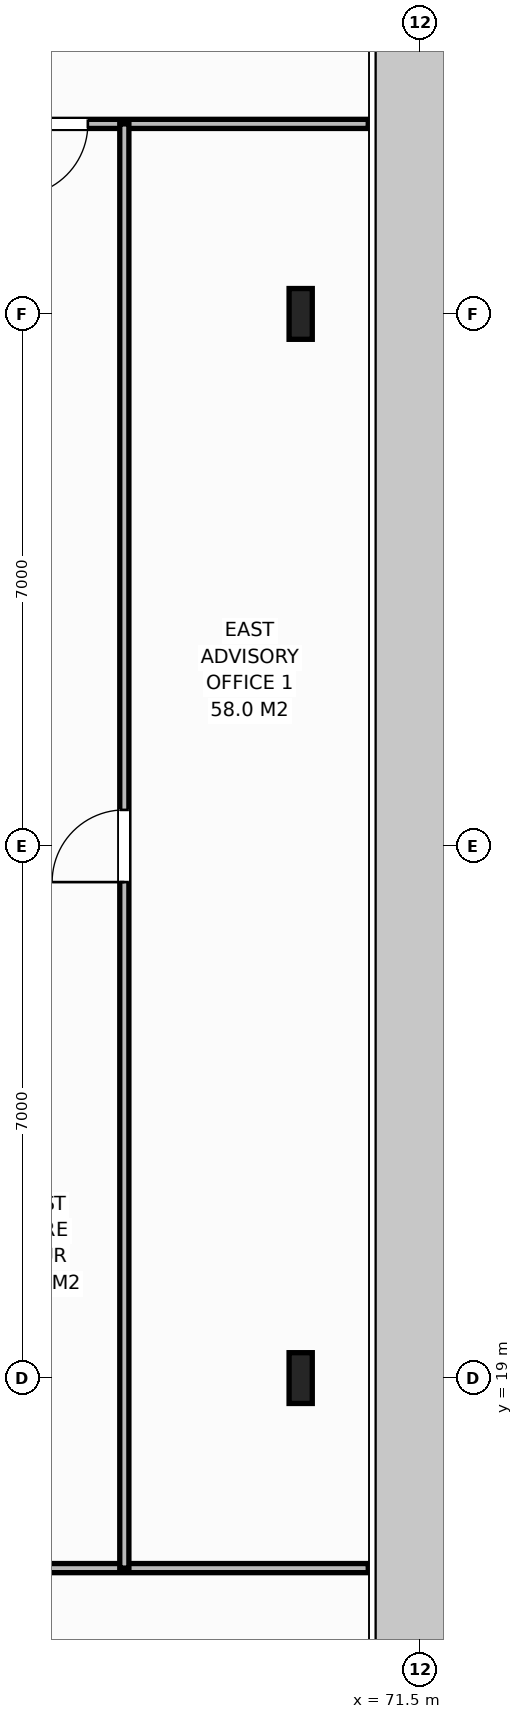
"""IFC4 building model, lengths in metres.
Left out: names, types, materials, properties, quantities, classifications, styles, units other than length and angle.
Written with IfcOpenShell. Run it as: python <this file> out.ifc"""

import sys

from ifc_helpers import new_model, si_unit, direction, frame, frame_2d, origin, origin_2d, place, context, subcontext, project, spatial, rectangle, i_section, extrude, element, fill, save


model = new_model("IFC4")
c1 = context("Model", 3, precision=1e-05, world=origin(), true_north=direction((0.0, 1.0)))
c2 = subcontext(c1, "Body", "Model", "MODEL_VIEW")
j1 = project(units=[si_unit("LENGTHUNIT", "METRE"), si_unit("PLANEANGLEUNIT", "RADIAN")], contexts=[c1])
p1 = place(None, origin())
s1 = spatial("IfcSite", under=j1, at=p1, CompositionType="ELEMENT")
p2 = place(p1, origin())
s2 = spatial("IfcBuilding", under=s1, at=p2, CompositionType="ELEMENT")
p3 = place(p2, frame((0.0, 0.0, 263.2)))
s3 = spatial("IfcBuildingStorey", under=s2, at=p3, CompositionType="ELEMENT", Elevation=263.2)
for number, where, z_axis, x_axis in (
    (1, (69.92, 19.0, 0.0), (0.0, 0.0, 1.0), (1.0, 0.0, 0.0)),
    (2, (69.92, 33.0, 0.0), (0.0, 0.0, 1.0), (1.0, 0.0, 0.0)),
):
    element("IfcColumn", number, at=place(p3, frame(where, z_axis=z_axis, x_axis=x_axis)), inside=s3, PredefinedType="COLUMN", context=c2, shape_type="SweptSolid", body=[
        extrude(i_section(OverallWidth=0.305, OverallDepth=0.668, WebThickness=0.021, FlangeThickness=0.04, at=origin_2d()), origin(), (0.0, 0.0, 1.0), 3.8),
    ])
p4 = place(p3, frame((65.07, 35.5, 0.0), z_axis=(0.0, 0.0, 1.0), x_axis=(1.0, 0.0, 0.0)))
e3 = element("IfcWall", 3, at=p4, inside=s3, PredefinedType="PARTITIONING", context=c2, shape_type="SweptSolid", body=[
    extrude(rectangle(XDim=5.739, YDim=0.12, at=frame_2d((2.87, 0.0))), origin(), (0.0, 0.0, 1.0), 3.588),
])
p5 = place(p4, frame((1.1, 0.0, 0.0)))
e4 = element("IfcOpeningElement", 4, at=p5, cuts=e3, PredefinedType="OPENING", context=c2, shape_type="SweptSolid", body=[
    extrude(rectangle(XDim=0.95, YDim=2.15, at=frame_2d((0.475, 1.075))), frame((0.0, 0.07, 0.0), z_axis=(0.0, -1.0, 0.0), x_axis=(1.0, 0.0, 0.0)), (0.0, 0.0, 1.0), 0.14),
])
p6 = place(p3, frame((56.927, 16.5, 0.0), z_axis=(0.0, 0.0, 1.0), x_axis=(1.0, 0.0, 0.0)))
e5 = element("IfcWall", 5, at=p6, inside=s3, PredefinedType="PARTITIONING", context=c2, shape_type="SweptSolid", body=[
    extrude(rectangle(XDim=13.882, YDim=0.12, at=frame_2d((6.941, 0.0))), origin(), (0.0, 0.0, 1.0), 3.588),
])
p7 = place(p6, frame((4.861, 0.0, 0.0)))
e6 = element("IfcOpeningElement", 6, at=p7, cuts=e5, PredefinedType="OPENING", context=c2, shape_type="SweptSolid", body=[
    extrude(rectangle(XDim=0.95, YDim=2.15, at=frame_2d((0.475, 1.075))), frame((0.0, 0.07, 0.0), z_axis=(0.0, -1.0, 0.0), x_axis=(1.0, 0.0, 0.0)), (0.0, 0.0, 1.0), 0.14),
])
p8 = place(p3, frame((67.6, 16.5, 0.0), z_axis=(0.0, 0.0, 1.0), x_axis=(0.0, 1.0, 0.0)))
e7 = element("IfcWall", 7, at=p8, inside=s3, PredefinedType="PARTITIONING", context=c2, shape_type="SweptSolid", body=[
    extrude(rectangle(XDim=19.0, YDim=0.12, at=frame_2d((9.5, 0.0))), origin(), (0.0, 0.0, 1.0), 3.588),
])
p9 = place(p8, frame((9.025, 0.0, 0.0)))
e8 = element("IfcOpeningElement", 8, at=p9, cuts=e7, PredefinedType="OPENING", context=c2, shape_type="SweptSolid", body=[
    extrude(rectangle(XDim=0.95, YDim=2.15, at=frame_2d((0.475, 1.075))), frame((0.0, 0.07, 0.0), z_axis=(0.0, -1.0, 0.0), x_axis=(1.0, 0.0, 0.0)), (0.0, 0.0, 1.0), 0.14),
])
p10 = place(p5, origin())
e9 = element("IfcDoor", 9, at=p10, inside=s3, OperationType="SINGLE_SWING_RIGHT", PredefinedType="DOOR", context=c2, shape_type="SweptSolid", body=[
    extrude(rectangle(XDim=0.95, YDim=2.15, at=frame_2d((0.475, 1.075))), frame((0.0, 0.025, 0.0), z_axis=(0.0, -1.0, 0.0), x_axis=(1.0, 0.0, 0.0)), (0.0, 0.0, 1.0), 0.05),
])
fill(e4, e9)
p11 = place(p9, origin())
e10 = element("IfcDoor", 10, at=p11, inside=s3, OperationType="SINGLE_SWING_LEFT", PredefinedType="DOOR", context=c2, shape_type="SweptSolid", body=[
    extrude(rectangle(XDim=0.95, YDim=2.15, at=frame_2d((0.475, 1.075))), frame((0.0, 0.025, 0.0), z_axis=(0.0, -1.0, 0.0), x_axis=(1.0, 0.0, 0.0)), (0.0, 0.0, 1.0), 0.05),
])
fill(e8, e10)
save(model, sys.argv[1])
